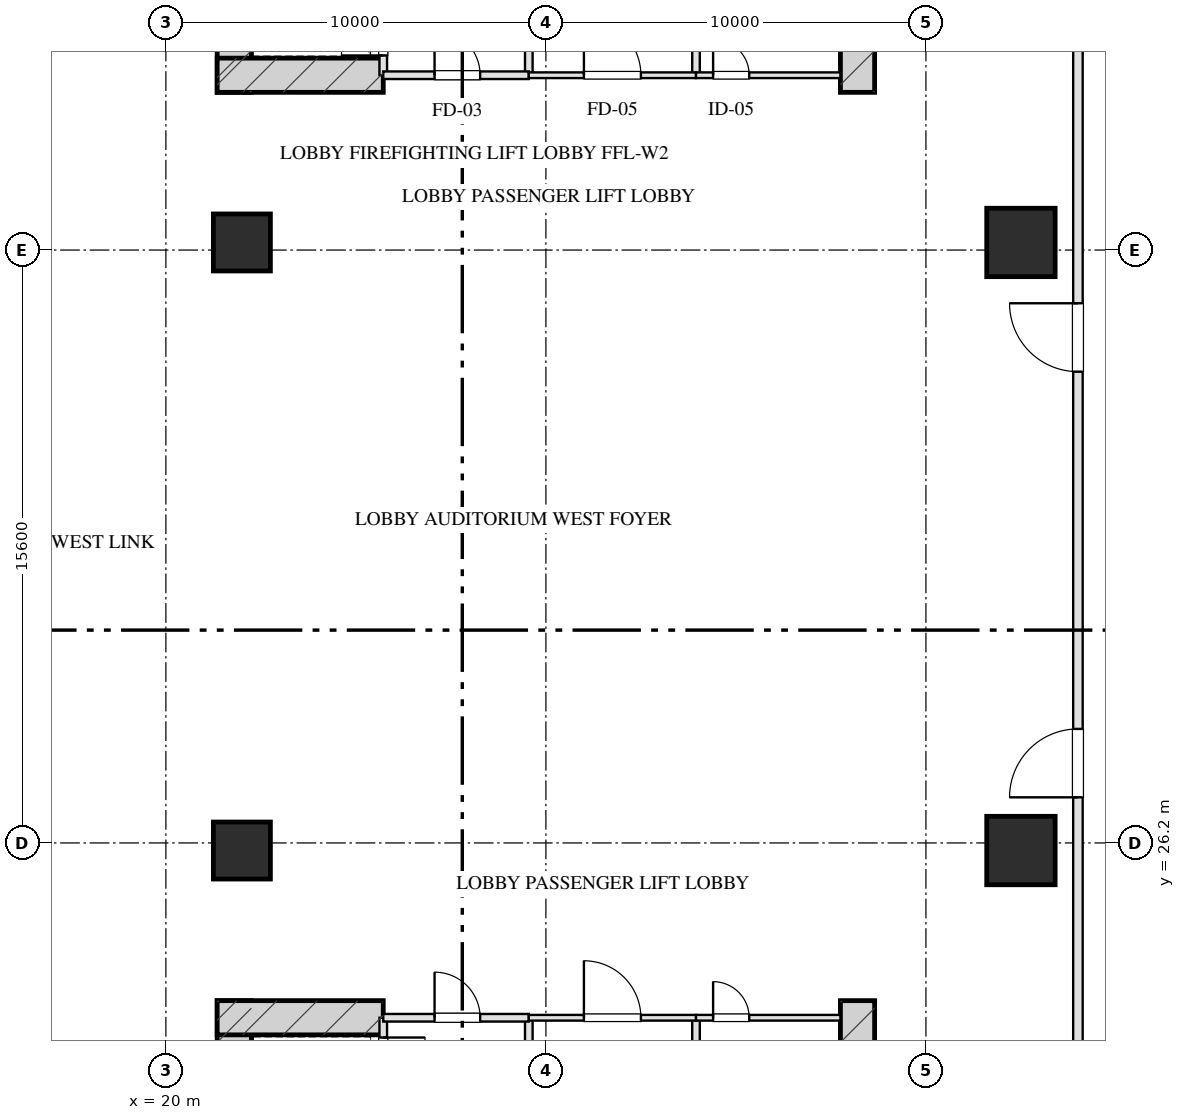
"""IFC4 building model, lengths in metres.
Left out: names, types, materials, properties, quantities, classifications, styles, units other than length and angle.
Written with IfcOpenShell. Run it as: python <this file> out.ifc"""

import sys

from ifc_helpers import new_model, si_unit, direction, frame, frame_2d, origin, origin_2d, place, context, subcontext, project, spatial, rectangle, hollow_rectangle, extrude, element, fill, save


model = new_model("IFC4")
c1 = context("Model", 3, precision=1e-05, world=origin(), true_north=direction((0.0, 1.0)))
c2 = subcontext(c1, "Body", "Model", "MODEL_VIEW")
j1 = project(units=[si_unit("LENGTHUNIT", "METRE"), si_unit("PLANEANGLEUNIT", "RADIAN")], contexts=[c1])
p1 = place(None, origin())
s1 = spatial("IfcSite", under=j1, at=p1, CompositionType="ELEMENT")
p2 = place(p1, origin())
s2 = spatial("IfcBuilding", under=s1, at=p2, CompositionType="ELEMENT")
p3 = place(p2, frame((0.0, 0.0, 6.0)))
s3 = spatial("IfcBuildingStorey", under=s2, at=p3, CompositionType="ELEMENT", Elevation=6.0)
for number, where, z_axis, x_axis in (
    (1, (21.8, 22.05, 0.0), (0.0, 0.0, 1.0), (0.0, -1.0, 0.0)),
    (2, (38.2, 22.05, 0.0), (0.0, 0.0, 1.0), (0.0, -1.0, 0.0)),
):
    element("IfcWall", number, at=place(p3, frame(where, z_axis=z_axis, x_axis=x_axis)), inside=s3, PredefinedType="SHEAR", context=c2, shape_type="SweptSolid", body=[
        extrude(rectangle(XDim=9.78, YDim=0.9, at=frame_2d((4.89, 0.0))), origin(), (0.0, 0.0, 1.0), 5.5),
    ])
p4 = place(p3, frame((21.35, 21.6, 0.0), z_axis=(0.0, 0.0, 1.0), x_axis=(1.0, 0.0, 0.0)))
e3 = element("IfcWall", 3, at=p4, inside=s3, PredefinedType="SHEAR", context=c2, shape_type="SweptSolid", body=[
    extrude(rectangle(XDim=4.37, YDim=0.9, at=frame_2d((2.185, 0.0))), origin(), (0.0, 0.0, 1.0), 5.5),
])
for number, where, z_axis, x_axis in (
    (4, (21.8, 45.95, 0.0), (0.0, 0.0, 1.0), (0.0, 1.0, 0.0)),
    (5, (38.2, 45.95, 0.0), (0.0, 0.0, 1.0), (0.0, 1.0, 0.0)),
):
    element("IfcWall", number, at=place(p3, frame(where, z_axis=z_axis, x_axis=x_axis)), inside=s3, PredefinedType="SHEAR", context=c2, shape_type="SweptSolid", body=[
        extrude(rectangle(XDim=9.78, YDim=0.9, at=frame_2d((4.89, 0.0))), origin(), (0.0, 0.0, 1.0), 5.5),
    ])
p5 = place(p3, frame((21.35, 46.4, 0.0), z_axis=(0.0, 0.0, 1.0), x_axis=(1.0, 0.0, 0.0)))
e6 = element("IfcWall", 6, at=p5, inside=s3, PredefinedType="SHEAR", context=c2, shape_type="SweptSolid", body=[
    extrude(rectangle(XDim=4.37, YDim=0.9, at=frame_2d((2.185, 0.0))), origin(), (0.0, 0.0, 1.0), 5.5),
])
for number, where, z_axis, x_axis in (
    (7, (22.0, 26.0, 0.0), (0.0, 0.0, 1.0), (1.0, 0.0, 0.0)),
    (8, (22.0, 42.0, 0.0), (0.0, 0.0, 1.0), (1.0, 0.0, 0.0)),
):
    element("IfcColumn", number, at=place(p3, frame(where, z_axis=z_axis, x_axis=x_axis)), inside=s3, PredefinedType="COLUMN", context=c2, shape_type="SweptSolid", body=[
        extrude(rectangle(XDim=1.5, YDim=1.5, at=origin_2d()), origin(), (0.0, 0.0, 1.0), 5.501),
    ])
for number, where, z_axis, x_axis in (
    (9, (42.5, 26.0, 0.0), (0.0, 0.0, 1.0), (1.0, 0.0, 0.0)),
    (10, (42.5, 42.0, 0.0), (0.0, 0.0, 1.0), (1.0, 0.0, 0.0)),
):
    element("IfcColumn", number, at=place(p3, frame(where, z_axis=z_axis, x_axis=x_axis)), inside=s3, PredefinedType="COLUMN", context=c2, shape_type="SweptSolid", body=[
        extrude(hollow_rectangle(XDim=1.8, YDim=1.8, WallThickness=0.06, at=origin_2d()), origin(), (0.0, 0.0, 1.0), 5.501),
    ])
p6 = place(p3, frame((25.72, 21.6, 0.0), z_axis=(0.0, 0.0, 1.0), x_axis=(0.0, -1.0, 0.0)))
e11 = element("IfcWall", 11, at=p6, inside=s3, PredefinedType="PARTITIONING", context=c2, shape_type="SweptSolid", body=[
    extrude(rectangle(XDim=1.9, YDim=0.2, at=frame_2d((0.95, 0.0))), origin(), (0.0, 0.0, 1.0), 5.185),
])
p7 = place(p6, frame((0.52, 0.0, 0.0)))
e12 = element("IfcOpeningElement", 12, at=p7, cuts=e11, PredefinedType="OPENING", context=c2, shape_type="SweptSolid", body=[
    extrude(rectangle(XDim=1.1, YDim=2.05, at=frame_2d((0.55, 1.025))), frame((0.0, 0.11, 0.0), z_axis=(0.0, -1.0, 0.0), x_axis=(1.0, 0.0, 0.0)), (0.0, 0.0, 1.0), 0.22),
])
p8 = place(p3, frame((29.55, 21.6, 0.0), z_axis=(0.0, 0.0, 1.0), x_axis=(0.0, -1.0, 0.0)))
e13 = element("IfcWall", 13, at=p8, inside=s3, PredefinedType="PARTITIONING", context=c2, shape_type="SweptSolid", body=[
    extrude(rectangle(XDim=8.43, YDim=0.2, at=frame_2d((4.215, 0.0))), origin(), (0.0, 0.0, 1.0), 5.185),
])
p9 = place(p3, frame((25.72, 21.6, 0.0), z_axis=(0.0, 0.0, 1.0), x_axis=(1.0, 0.0, 0.0)))
e14 = element("IfcWall", 14, at=p9, inside=s3, PredefinedType="PARTITIONING", context=c2, shape_type="SweptSolid", body=[
    extrude(rectangle(XDim=3.83, YDim=0.2, at=frame_2d((1.915, 0.0))), origin(), (0.0, 0.0, 1.0), 5.185),
])
p10 = place(p9, frame((1.35, 0.0, 0.0)))
e15 = element("IfcOpeningElement", 15, at=p10, cuts=e14, PredefinedType="OPENING", context=c2, shape_type="SweptSolid", body=[
    extrude(rectangle(XDim=1.2, YDim=2.05, at=frame_2d((0.6, 1.025))), frame((0.0, 0.11, 0.0), z_axis=(0.0, -1.0, 0.0), x_axis=(1.0, 0.0, 0.0)), (0.0, 0.0, 1.0), 0.22),
])
p11 = place(p3, frame((33.95, 21.6, 0.0), z_axis=(0.0, 0.0, 1.0), x_axis=(0.0, -1.0, 0.0)))
e16 = element("IfcWall", 16, at=p11, inside=s3, PredefinedType="PARTITIONING", context=c2, shape_type="SweptSolid", body=[
    extrude(rectangle(XDim=8.43, YDim=0.2, at=frame_2d((4.215, 0.0))), origin(), (0.0, 0.0, 1.0), 5.185),
])
p12 = place(p3, frame((29.55, 21.6, 0.0), z_axis=(0.0, 0.0, 1.0), x_axis=(1.0, 0.0, 0.0)))
e17 = element("IfcWall", 17, at=p12, inside=s3, PredefinedType="PARTITIONING", context=c2, shape_type="SweptSolid", body=[
    extrude(rectangle(XDim=4.4, YDim=0.15, at=frame_2d((2.2, 0.0))), origin(), (0.0, 0.0, 1.0), 5.185),
])
p13 = place(p12, frame((1.45, 0.0, 0.0)))
e18 = element("IfcOpeningElement", 18, at=p13, cuts=e17, PredefinedType="OPENING", context=c2, shape_type="SweptSolid", body=[
    extrude(rectangle(XDim=1.5, YDim=2.05, at=frame_2d((0.75, 1.025))), frame((0.0, 0.085, 0.0), z_axis=(0.0, -1.0, 0.0), x_axis=(1.0, 0.0, 0.0)), (0.0, 0.0, 1.0), 0.17),
])
p14 = place(p3, frame((33.95, 21.6, 0.0), z_axis=(0.0, 0.0, 1.0), x_axis=(1.0, 0.0, 0.0)))
e19 = element("IfcWall", 19, at=p14, inside=s3, PredefinedType="PARTITIONING", context=c2, shape_type="SweptSolid", body=[
    extrude(rectangle(XDim=3.8, YDim=0.15, at=frame_2d((1.9, 0.0))), origin(), (0.0, 0.0, 1.0), 5.185),
])
p15 = place(p14, frame((0.45, 0.0, 0.0)))
e20 = element("IfcOpeningElement", 20, at=p15, cuts=e19, PredefinedType="OPENING", context=c2, shape_type="SweptSolid", body=[
    extrude(rectangle(XDim=0.95, YDim=2.05, at=frame_2d((0.475, 1.025))), frame((0.0, 0.085, 0.0), z_axis=(0.0, -1.0, 0.0), x_axis=(1.0, 0.0, 0.0)), (0.0, 0.0, 1.0), 0.17),
])
p16 = place(p3, frame((25.72, 46.4, 0.0), z_axis=(0.0, 0.0, 1.0), x_axis=(0.0, 1.0, 0.0)))
e21 = element("IfcWall", 21, at=p16, inside=s3, PredefinedType="PARTITIONING", context=c2, shape_type="SweptSolid", body=[
    extrude(rectangle(XDim=1.9, YDim=0.2, at=frame_2d((0.95, 0.0))), origin(), (0.0, 0.0, 1.0), 5.185),
])
p17 = place(p16, frame((0.52, 0.0, 0.0)))
e22 = element("IfcOpeningElement", 22, at=p17, cuts=e21, PredefinedType="OPENING", context=c2, shape_type="SweptSolid", body=[
    extrude(rectangle(XDim=1.1, YDim=2.05, at=frame_2d((0.55, 1.025))), frame((0.0, 0.11, 0.0), z_axis=(0.0, -1.0, 0.0), x_axis=(1.0, 0.0, 0.0)), (0.0, 0.0, 1.0), 0.22),
])
p18 = place(p3, frame((29.55, 46.4, 0.0), z_axis=(0.0, 0.0, 1.0), x_axis=(0.0, 1.0, 0.0)))
e23 = element("IfcWall", 23, at=p18, inside=s3, PredefinedType="PARTITIONING", context=c2, shape_type="SweptSolid", body=[
    extrude(rectangle(XDim=8.43, YDim=0.2, at=frame_2d((4.215, 0.0))), origin(), (0.0, 0.0, 1.0), 5.185),
])
p19 = place(p3, frame((25.72, 46.4, 0.0), z_axis=(0.0, 0.0, 1.0), x_axis=(1.0, 0.0, 0.0)))
e24 = element("IfcWall", 24, at=p19, inside=s3, PredefinedType="PARTITIONING", context=c2, shape_type="SweptSolid", body=[
    extrude(rectangle(XDim=3.83, YDim=0.2, at=frame_2d((1.915, 0.0))), origin(), (0.0, 0.0, 1.0), 5.185),
])
p20 = place(p19, frame((1.35, 0.0, 0.0)))
e25 = element("IfcOpeningElement", 25, at=p20, cuts=e24, PredefinedType="OPENING", context=c2, shape_type="SweptSolid", body=[
    extrude(rectangle(XDim=1.2, YDim=2.05, at=frame_2d((0.6, 1.025))), frame((0.0, 0.11, 0.0), z_axis=(0.0, -1.0, 0.0), x_axis=(1.0, 0.0, 0.0)), (0.0, 0.0, 1.0), 0.22),
])
p21 = place(p3, frame((33.95, 46.4, 0.0), z_axis=(0.0, 0.0, 1.0), x_axis=(0.0, 1.0, 0.0)))
e26 = element("IfcWall", 26, at=p21, inside=s3, PredefinedType="PARTITIONING", context=c2, shape_type="SweptSolid", body=[
    extrude(rectangle(XDim=8.43, YDim=0.2, at=frame_2d((4.215, 0.0))), origin(), (0.0, 0.0, 1.0), 5.185),
])
p22 = place(p3, frame((29.55, 46.4, 0.0), z_axis=(0.0, 0.0, 1.0), x_axis=(1.0, 0.0, 0.0)))
e27 = element("IfcWall", 27, at=p22, inside=s3, PredefinedType="PARTITIONING", context=c2, shape_type="SweptSolid", body=[
    extrude(rectangle(XDim=4.4, YDim=0.15, at=frame_2d((2.2, 0.0))), origin(), (0.0, 0.0, 1.0), 5.185),
])
p23 = place(p22, frame((1.45, 0.0, 0.0)))
e28 = element("IfcOpeningElement", 28, at=p23, cuts=e27, PredefinedType="OPENING", context=c2, shape_type="SweptSolid", body=[
    extrude(rectangle(XDim=1.5, YDim=2.05, at=frame_2d((0.75, 1.025))), frame((0.0, 0.085, 0.0), z_axis=(0.0, -1.0, 0.0), x_axis=(1.0, 0.0, 0.0)), (0.0, 0.0, 1.0), 0.17),
])
p24 = place(p3, frame((33.95, 46.4, 0.0), z_axis=(0.0, 0.0, 1.0), x_axis=(1.0, 0.0, 0.0)))
e29 = element("IfcWall", 29, at=p24, inside=s3, PredefinedType="PARTITIONING", context=c2, shape_type="SweptSolid", body=[
    extrude(rectangle(XDim=3.8, YDim=0.15, at=frame_2d((1.9, 0.0))), origin(), (0.0, 0.0, 1.0), 5.185),
])
p25 = place(p24, frame((0.45, 0.0, 0.0)))
e30 = element("IfcOpeningElement", 30, at=p25, cuts=e29, PredefinedType="OPENING", context=c2, shape_type="SweptSolid", body=[
    extrude(rectangle(XDim=0.95, YDim=2.05, at=frame_2d((0.475, 1.025))), frame((0.0, 0.085, 0.0), z_axis=(0.0, -1.0, 0.0), x_axis=(1.0, 0.0, 0.0)), (0.0, 0.0, 1.0), 0.17),
])
p26 = place(p3, frame((44.0, 18.0, 0.0), z_axis=(0.0, 0.0, 1.0), x_axis=(0.0, 1.0, 0.0)))
e31 = element("IfcWall", 31, at=p26, inside=s3, PredefinedType="PARTITIONING", context=c2, shape_type="SweptSolid", body=[
    extrude(rectangle(XDim=32.0, YDim=0.25, at=frame_2d((16.0, 0.0))), origin(), (0.0, 0.0, 1.0), 5.185),
])
p27 = place(p26, frame((9.4, 0.0, 0.0)))
e32 = element("IfcOpeningElement", 32, at=p27, cuts=e31, PredefinedType="OPENING", context=c2, shape_type="SweptSolid", body=[
    extrude(rectangle(XDim=1.8, YDim=2.05, at=frame_2d((0.9, 1.025))), frame((0.0, 0.135, 0.0), z_axis=(0.0, -1.0, 0.0), x_axis=(1.0, 0.0, 0.0)), (0.0, 0.0, 1.0), 0.27),
])
p28 = place(p26, frame((20.6, 0.0, 0.0)))
e33 = element("IfcOpeningElement", 33, at=p28, cuts=e31, PredefinedType="OPENING", context=c2, shape_type="SweptSolid", body=[
    extrude(rectangle(XDim=1.8, YDim=2.05, at=frame_2d((0.9, 1.025))), frame((0.0, 0.135, 0.0), z_axis=(0.0, -1.0, 0.0), x_axis=(1.0, 0.0, 0.0)), (0.0, 0.0, 1.0), 0.27),
])
p29 = place(p7, origin())
e34 = element("IfcDoor", 34, at=p29, inside=s3, OperationType="SINGLE_SWING_LEFT", PredefinedType="DOOR", context=c2, shape_type="SweptSolid", body=[
    extrude(rectangle(XDim=1.1, YDim=2.05, at=frame_2d((0.55, 1.025))), frame((0.0, 0.025, 0.0), z_axis=(0.0, -1.0, 0.0), x_axis=(1.0, 0.0, 0.0)), (0.0, 0.0, 1.0), 0.05),
])
fill(e12, e34)
p30 = place(p10, origin())
e35 = element("IfcDoor", 35, at=p30, inside=s3, OperationType="SINGLE_SWING_LEFT", PredefinedType="DOOR", context=c2, shape_type="SweptSolid", body=[
    extrude(rectangle(XDim=1.2, YDim=2.05, at=frame_2d((0.6, 1.025))), frame((0.0, 0.025, 0.0), z_axis=(0.0, -1.0, 0.0), x_axis=(1.0, 0.0, 0.0)), (0.0, 0.0, 1.0), 0.05),
])
fill(e15, e35)
p31 = place(p13, origin())
e36 = element("IfcDoor", 36, at=p31, inside=s3, OperationType="SINGLE_SWING_LEFT", PredefinedType="DOOR", context=c2, shape_type="SweptSolid", body=[
    extrude(rectangle(XDim=1.5, YDim=2.05, at=frame_2d((0.75, 1.025))), frame((0.0, 0.025, 0.0), z_axis=(0.0, -1.0, 0.0), x_axis=(1.0, 0.0, 0.0)), (0.0, 0.0, 1.0), 0.05),
])
fill(e18, e36)
p32 = place(p15, origin())
e37 = element("IfcDoor", 37, at=p32, inside=s3, OperationType="SINGLE_SWING_LEFT", PredefinedType="DOOR", context=c2, shape_type="SweptSolid", body=[
    extrude(rectangle(XDim=0.95, YDim=2.05, at=frame_2d((0.475, 1.025))), frame((0.0, 0.025, 0.0), z_axis=(0.0, -1.0, 0.0), x_axis=(1.0, 0.0, 0.0)), (0.0, 0.0, 1.0), 0.05),
])
fill(e20, e37)
p33 = place(p17, origin())
e38 = element("IfcDoor", 38, at=p33, inside=s3, OperationType="SINGLE_SWING_LEFT", PredefinedType="DOOR", context=c2, shape_type="SweptSolid", body=[
    extrude(rectangle(XDim=1.1, YDim=2.05, at=frame_2d((0.55, 1.025))), frame((0.0, 0.025, 0.0), z_axis=(0.0, -1.0, 0.0), x_axis=(1.0, 0.0, 0.0)), (0.0, 0.0, 1.0), 0.05),
])
fill(e22, e38)
p34 = place(p20, origin())
e39 = element("IfcDoor", 39, at=p34, inside=s3, OperationType="SINGLE_SWING_LEFT", PredefinedType="DOOR", context=c2, shape_type="SweptSolid", body=[
    extrude(rectangle(XDim=1.2, YDim=2.05, at=frame_2d((0.6, 1.025))), frame((0.0, 0.025, 0.0), z_axis=(0.0, -1.0, 0.0), x_axis=(1.0, 0.0, 0.0)), (0.0, 0.0, 1.0), 0.05),
])
fill(e25, e39)
p35 = place(p23, origin())
e40 = element("IfcDoor", 40, at=p35, inside=s3, OperationType="SINGLE_SWING_LEFT", PredefinedType="DOOR", context=c2, shape_type="SweptSolid", body=[
    extrude(rectangle(XDim=1.5, YDim=2.05, at=frame_2d((0.75, 1.025))), frame((0.0, 0.025, 0.0), z_axis=(0.0, -1.0, 0.0), x_axis=(1.0, 0.0, 0.0)), (0.0, 0.0, 1.0), 0.05),
])
fill(e28, e40)
p36 = place(p25, origin())
e41 = element("IfcDoor", 41, at=p36, inside=s3, OperationType="SINGLE_SWING_LEFT", PredefinedType="DOOR", context=c2, shape_type="SweptSolid", body=[
    extrude(rectangle(XDim=0.95, YDim=2.05, at=frame_2d((0.475, 1.025))), frame((0.0, 0.025, 0.0), z_axis=(0.0, -1.0, 0.0), x_axis=(1.0, 0.0, 0.0)), (0.0, 0.0, 1.0), 0.05),
])
fill(e30, e41)
p37 = place(p27, origin())
e42 = element("IfcDoor", 42, at=p37, inside=s3, OperationType="SINGLE_SWING_LEFT", PredefinedType="DOOR", context=c2, shape_type="SweptSolid", body=[
    extrude(rectangle(XDim=1.8, YDim=2.05, at=frame_2d((0.9, 1.025))), frame((0.0, 0.025, 0.0), z_axis=(0.0, -1.0, 0.0), x_axis=(1.0, 0.0, 0.0)), (0.0, 0.0, 1.0), 0.05),
])
fill(e32, e42)
p38 = place(p28, origin())
e43 = element("IfcDoor", 43, at=p38, inside=s3, OperationType="SINGLE_SWING_RIGHT", PredefinedType="DOOR", context=c2, shape_type="SweptSolid", body=[
    extrude(rectangle(XDim=1.8, YDim=2.05, at=frame_2d((0.9, 1.025))), frame((0.0, 0.025, 0.0), z_axis=(0.0, -1.0, 0.0), x_axis=(1.0, 0.0, 0.0)), (0.0, 0.0, 1.0), 0.05),
])
fill(e33, e43)
save(model, sys.argv[1])
